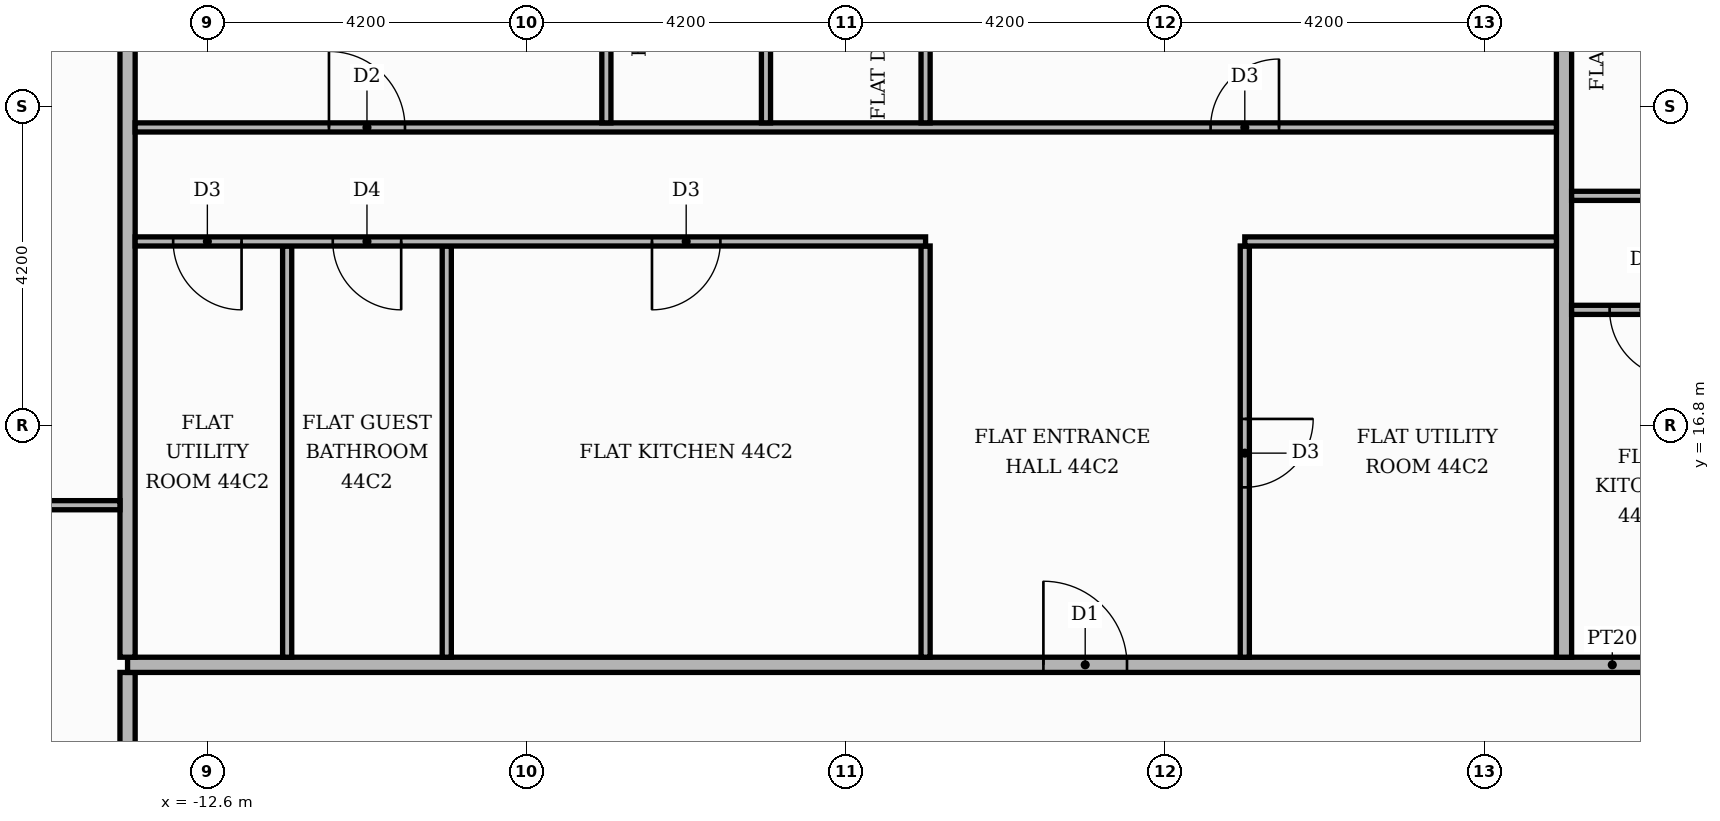
"""IFC4 building model, lengths in metres.
Left out: names, types, materials, properties, quantities, classifications, styles, units other than length and angle.
Written with IfcOpenShell. Run it as: python <this file> out.ifc"""

import sys

from ifc_helpers import new_model, si_unit, direction, frame, frame_2d, origin, place, context, subcontext, project, spatial, rectangle, extrude, element, fill, save


model = new_model("IFC4")
c1 = context("Model", 3, precision=1e-05, world=origin(), true_north=direction((0.0, 1.0)))
c2 = subcontext(c1, "Body", "Model", "MODEL_VIEW")
j1 = project(units=[si_unit("LENGTHUNIT", "METRE"), si_unit("PLANEANGLEUNIT", "RADIAN")], contexts=[c1])
p1 = place(None, origin())
s1 = spatial("IfcSite", under=j1, at=p1, CompositionType="ELEMENT")
p2 = place(p1, origin())
s2 = spatial("IfcBuilding", under=s1, at=p2, CompositionType="ELEMENT")
p3 = place(p2, frame((0.0, 0.0, 188.4)))
s3 = spatial("IfcBuildingStorey", under=s2, at=p3, CompositionType="ELEMENT", Elevation=188.4)
p4 = place(p3, frame((-13.65, 5.35, 0.0), z_axis=(0.0, 0.0, 1.0), x_axis=(0.0, 1.0, 0.0)))
e1 = element("IfcWall", 1, at=p4, inside=s3, PredefinedType="PARTITIONING", context=c2, shape_type="SweptSolid", body=[
    extrude(rectangle(XDim=8.2, YDim=0.2, at=frame_2d((4.1, 0.0))), origin(), (0.0, 0.0, 1.0), 3.48),
])
p5 = place(p4, frame((5.65, 0.0, 0.0)))
e2 = element("IfcOpeningElement", 2, at=p5, cuts=e1, PredefinedType="OPENING", context=c2, shape_type="SweptSolid", body=[
    extrude(rectangle(XDim=1.1, YDim=2.4, at=frame_2d((0.55, 1.2))), frame((0.0, 0.11, 0.0), z_axis=(0.0, -1.0, 0.0), x_axis=(1.0, 0.0, 0.0)), (0.0, 0.0, 1.0), 0.22),
])
p6 = place(p3, frame((-13.65, 13.65, 0.0), z_axis=(0.0, 0.0, 1.0), x_axis=(1.0, 0.0, 0.0)))
e3 = element("IfcWall", 3, at=p6, inside=s3, PredefinedType="PARTITIONING", context=c2, shape_type="SweptSolid", body=[
    extrude(rectangle(XDim=39.07, YDim=0.2, at=frame_2d((19.535, 0.0))), origin(), (0.0, 0.0, 1.0), 3.48),
])
p7 = place(p6, frame((24.65, 0.0, 0.0)))
e4 = element("IfcOpeningElement", 4, at=p7, cuts=e3, PredefinedType="OPENING", context=c2, shape_type="SweptSolid", body=[
    extrude(rectangle(XDim=1.1, YDim=2.4, at=frame_2d((0.55, 1.2))), frame((0.0, 0.11, 0.0), z_axis=(0.0, -1.0, 0.0), x_axis=(1.0, 0.0, 0.0)), (0.0, 0.0, 1.0), 0.22),
])
p8 = place(p6, frame((12.05, 0.0, 0.0)))
e5 = element("IfcOpeningElement", 5, at=p8, cuts=e3, PredefinedType="OPENING", context=c2, shape_type="SweptSolid", body=[
    extrude(rectangle(XDim=1.1, YDim=2.4, at=frame_2d((0.55, 1.2))), frame((0.0, 0.11, 0.0), z_axis=(0.0, -1.0, 0.0), x_axis=(1.0, 0.0, 0.0)), (0.0, 0.0, 1.0), 0.22),
])
p9 = place(p3, frame((-13.65, 13.75, 0.0), z_axis=(0.0, 0.0, 1.0), x_axis=(0.0, 1.0, 0.0)))
e6 = element("IfcWall", 6, at=p9, inside=s3, PredefinedType="PARTITIONING", context=c2, shape_type="SweptSolid", body=[
    extrude(rectangle(XDim=11.67, YDim=0.2, at=frame_2d((5.835, 0.0))), origin(), (0.0, 0.0, 1.0), 3.48),
])
for number, where, z_axis, x_axis in (
    (7, (-11.55, 13.75, 0.0), (0.0, 0.0, 1.0), (0.0, 1.0, 0.0)),
    (8, (-9.45, 13.75, 0.0), (0.0, 0.0, 1.0), (0.0, 1.0, 0.0)),
    (9, (-3.15, 13.75, 0.0), (0.0, 0.0, 1.0), (0.0, 1.0, 0.0)),
):
    element("IfcWall", number, at=place(p3, frame(where, z_axis=z_axis, x_axis=x_axis)), inside=s3, PredefinedType="PARTITIONING", context=c2, shape_type="SweptSolid", body=[
        extrude(rectangle(XDim=5.41, YDim=0.12, at=frame_2d((2.705, 0.0))), origin(), (0.0, 0.0, 1.0), 3.48),
    ])
p10 = place(p3, frame((1.05, 13.75, 0.0), z_axis=(0.0, 0.0, 1.0), x_axis=(0.0, 1.0, 0.0)))
e10 = element("IfcWall", 10, at=p10, inside=s3, PredefinedType="PARTITIONING", context=c2, shape_type="SweptSolid", body=[
    extrude(rectangle(XDim=5.41, YDim=0.12, at=frame_2d((2.705, 0.0))), origin(), (0.0, 0.0, 1.0), 3.48),
])
p11 = place(p10, frame((2.235, 0.0, 0.0)))
e11 = element("IfcOpeningElement", 11, at=p11, cuts=e10, PredefinedType="OPENING", context=c2, shape_type="SweptSolid", body=[
    extrude(rectangle(XDim=0.9, YDim=2.1, at=frame_2d((0.45, 1.05))), frame((0.0, 0.07, 0.0), z_axis=(0.0, -1.0, 0.0), x_axis=(1.0, 0.0, 0.0)), (0.0, 0.0, 1.0), 0.14),
])
p12 = place(p3, frame((5.25, 13.75, 0.0), z_axis=(0.0, 0.0, 1.0), x_axis=(0.0, 1.0, 0.0)))
e12 = element("IfcWall", 12, at=p12, inside=s3, PredefinedType="PARTITIONING", context=c2, shape_type="SweptSolid", body=[
    extrude(rectangle(XDim=11.67, YDim=0.2, at=frame_2d((5.835, 0.0))), origin(), (0.0, 0.0, 1.0), 3.48),
])
p13 = place(p3, frame((-20.42, 15.75, 0.0), z_axis=(0.0, 0.0, 1.0), x_axis=(1.0, 0.0, 0.0)))
e13 = element("IfcWall", 13, at=p13, inside=s3, PredefinedType="PARTITIONING", context=c2, shape_type="SweptSolid", body=[
    extrude(rectangle(XDim=6.67, YDim=0.12, at=frame_2d((3.335, 0.0))), origin(), (0.0, 0.0, 1.0), 3.48),
])
p14 = place(p13, frame((2.885, 0.0, 0.0)))
e14 = element("IfcOpeningElement", 14, at=p14, cuts=e13, PredefinedType="OPENING", context=c2, shape_type="SweptSolid", body=[
    extrude(rectangle(XDim=1.0, YDim=2.1, at=frame_2d((0.5, 1.05))), frame((0.0, 0.07, 0.0), z_axis=(0.0, -1.0, 0.0), x_axis=(1.0, 0.0, 0.0)), (0.0, 0.0, 1.0), 0.14),
])
p15 = place(p3, frame((5.35, 18.32, 0.0), z_axis=(0.0, 0.0, 1.0), x_axis=(1.0, 0.0, 0.0)))
e15 = element("IfcWall", 15, at=p15, inside=s3, PredefinedType="PARTITIONING", context=c2, shape_type="SweptSolid", body=[
    extrude(rectangle(XDim=4.1, YDim=0.12, at=frame_2d((2.05, 0.0))), origin(), (0.0, 0.0, 1.0), 3.48),
])
p16 = place(p15, frame((0.5, 0.0, 0.0)))
e16 = element("IfcOpeningElement", 16, at=p16, cuts=e15, PredefinedType="OPENING", context=c2, shape_type="SweptSolid", body=[
    extrude(rectangle(XDim=0.9, YDim=2.1, at=frame_2d((0.45, 1.05))), frame((0.0, 0.07, 0.0), z_axis=(0.0, -1.0, 0.0), x_axis=(1.0, 0.0, 0.0)), (0.0, 0.0, 1.0), 0.14),
])
p17 = place(p3, frame((-13.55, 19.22, 0.0), z_axis=(0.0, 0.0, 1.0), x_axis=(1.0, 0.0, 0.0)))
e17 = element("IfcWall", 17, at=p17, inside=s3, PredefinedType="PARTITIONING", context=c2, shape_type="SweptSolid", body=[
    extrude(rectangle(XDim=10.4, YDim=0.12, at=frame_2d((5.2, 0.0))), origin(), (0.0, 0.0, 1.0), 3.48),
])
p18 = place(p17, frame((6.8, 0.0, 0.0)))
e18 = element("IfcOpeningElement", 18, at=p18, cuts=e17, PredefinedType="OPENING", context=c2, shape_type="SweptSolid", body=[
    extrude(rectangle(XDim=0.9, YDim=2.1, at=frame_2d((0.45, 1.05))), frame((0.0, 0.07, 0.0), z_axis=(0.0, -1.0, 0.0), x_axis=(1.0, 0.0, 0.0)), (0.0, 0.0, 1.0), 0.14),
])
p19 = place(p17, frame((2.6, 0.0, 0.0)))
e19 = element("IfcOpeningElement", 19, at=p19, cuts=e17, PredefinedType="OPENING", context=c2, shape_type="SweptSolid", body=[
    extrude(rectangle(XDim=0.9, YDim=2.1, at=frame_2d((0.45, 1.05))), frame((0.0, 0.07, 0.0), z_axis=(0.0, -1.0, 0.0), x_axis=(1.0, 0.0, 0.0)), (0.0, 0.0, 1.0), 0.14),
])
p20 = place(p17, frame((0.5, 0.0, 0.0)))
e20 = element("IfcOpeningElement", 20, at=p20, cuts=e17, PredefinedType="OPENING", context=c2, shape_type="SweptSolid", body=[
    extrude(rectangle(XDim=0.9, YDim=2.1, at=frame_2d((0.45, 1.05))), frame((0.0, 0.07, 0.0), z_axis=(0.0, -1.0, 0.0), x_axis=(1.0, 0.0, 0.0)), (0.0, 0.0, 1.0), 0.14),
])
p21 = place(p3, frame((1.05, 19.22, 0.0), z_axis=(0.0, 0.0, 1.0), x_axis=(1.0, 0.0, 0.0)))
e21 = element("IfcWall", 21, at=p21, inside=s3, PredefinedType="PARTITIONING", context=c2, shape_type="SweptSolid", body=[
    extrude(rectangle(XDim=4.1, YDim=0.12, at=frame_2d((2.05, 0.0))), origin(), (0.0, 0.0, 1.0), 3.48),
])
p22 = place(p3, frame((5.35, 19.82, 0.0), z_axis=(0.0, 0.0, 1.0), x_axis=(1.0, 0.0, 0.0)))
e22 = element("IfcWall", 22, at=p22, inside=s3, PredefinedType="PARTITIONING", context=c2, shape_type="SweptSolid", body=[
    extrude(rectangle(XDim=12.25, YDim=0.12, at=frame_2d((6.125, 0.0))), origin(), (0.0, 0.0, 1.0), 3.48),
])
p23 = place(p22, frame((8.85, 0.0, 0.0)))
e23 = element("IfcOpeningElement", 23, at=p23, cuts=e22, PredefinedType="OPENING", context=c2, shape_type="SweptSolid", body=[
    extrude(rectangle(XDim=1.0, YDim=2.1, at=frame_2d((0.5, 1.05))), frame((0.0, 0.07, 0.0), z_axis=(0.0, -1.0, 0.0), x_axis=(1.0, 0.0, 0.0)), (0.0, 0.0, 1.0), 0.14),
])
p24 = place(p22, frame((5.75, 0.0, 0.0)))
e24 = element("IfcOpeningElement", 24, at=p24, cuts=e22, PredefinedType="OPENING", context=c2, shape_type="SweptSolid", body=[
    extrude(rectangle(XDim=0.9, YDim=2.1, at=frame_2d((0.45, 1.05))), frame((0.0, 0.07, 0.0), z_axis=(0.0, -1.0, 0.0), x_axis=(1.0, 0.0, 0.0)), (0.0, 0.0, 1.0), 0.14),
])
p25 = place(p3, frame((-13.55, 20.72, 0.0), z_axis=(0.0, 0.0, 1.0), x_axis=(1.0, 0.0, 0.0)))
e25 = element("IfcWall", 25, at=p25, inside=s3, PredefinedType="PARTITIONING", context=c2, shape_type="SweptSolid", body=[
    extrude(rectangle(XDim=18.7, YDim=0.12, at=frame_2d((9.35, 0.0))), origin(), (0.0, 0.0, 1.0), 3.48),
])
p26 = place(p25, frame((14.15, 0.0, 0.0)))
e26 = element("IfcOpeningElement", 26, at=p26, cuts=e25, PredefinedType="OPENING", context=c2, shape_type="SweptSolid", body=[
    extrude(rectangle(XDim=0.9, YDim=2.1, at=frame_2d((0.45, 1.05))), frame((0.0, 0.07, 0.0), z_axis=(0.0, -1.0, 0.0), x_axis=(1.0, 0.0, 0.0)), (0.0, 0.0, 1.0), 0.14),
])
p27 = place(p25, frame((2.55, 0.0, 0.0)))
e27 = element("IfcOpeningElement", 27, at=p27, cuts=e25, PredefinedType="OPENING", context=c2, shape_type="SweptSolid", body=[
    extrude(rectangle(XDim=1.0, YDim=2.1, at=frame_2d((0.5, 1.05))), frame((0.0, 0.07, 0.0), z_axis=(0.0, -1.0, 0.0), x_axis=(1.0, 0.0, 0.0)), (0.0, 0.0, 1.0), 0.14),
])
p28 = place(p3, frame((-7.35, 20.78, 0.0), z_axis=(0.0, 0.0, 1.0), x_axis=(0.0, 1.0, 0.0)))
e28 = element("IfcWall", 28, at=p28, inside=s3, PredefinedType="PARTITIONING", context=c2, shape_type="SweptSolid", body=[
    extrude(rectangle(XDim=4.64, YDim=0.12, at=frame_2d((2.32, 0.0))), origin(), (0.0, 0.0, 1.0), 3.48),
])
p29 = place(p3, frame((-5.25, 20.78, 0.0), z_axis=(0.0, 0.0, 1.0), x_axis=(0.0, 1.0, 0.0)))
e29 = element("IfcWall", 29, at=p29, inside=s3, PredefinedType="PARTITIONING", context=c2, shape_type="SweptSolid", body=[
    extrude(rectangle(XDim=4.64, YDim=0.12, at=frame_2d((2.32, 0.0))), origin(), (0.0, 0.0, 1.0), 3.48),
])
p30 = place(p29, frame((1.99, 0.0, 0.0)))
e30 = element("IfcOpeningElement", 30, at=p30, cuts=e29, PredefinedType="OPENING", context=c2, shape_type="SweptSolid", body=[
    extrude(rectangle(XDim=0.9, YDim=2.1, at=frame_2d((0.45, 1.05))), frame((0.0, 0.07, 0.0), z_axis=(0.0, -1.0, 0.0), x_axis=(1.0, 0.0, 0.0)), (0.0, 0.0, 1.0), 0.14),
])
p31 = place(p3, frame((-3.15, 20.78, 0.0), z_axis=(0.0, 0.0, 1.0), x_axis=(0.0, 1.0, 0.0)))
e31 = element("IfcWall", 31, at=p31, inside=s3, PredefinedType="PARTITIONING", context=c2, shape_type="SweptSolid", body=[
    extrude(rectangle(XDim=4.64, YDim=0.12, at=frame_2d((2.32, 0.0))), origin(), (0.0, 0.0, 1.0), 3.48),
])
p32 = place(p31, frame((1.99, 0.0, 0.0)))
e32 = element("IfcOpeningElement", 32, at=p32, cuts=e31, PredefinedType="OPENING", context=c2, shape_type="SweptSolid", body=[
    extrude(rectangle(XDim=0.9, YDim=2.1, at=frame_2d((0.45, 1.05))), frame((0.0, 0.07, 0.0), z_axis=(0.0, -1.0, 0.0), x_axis=(1.0, 0.0, 0.0)), (0.0, 0.0, 1.0), 0.14),
])
p33 = place(p16, frame((0.9, 0.0, 0.0), z_axis=(0.0, 0.0, 1.0), x_axis=(-1.0, 0.0, 0.0)))
e33 = element("IfcDoor", 33, at=p33, inside=s3, OperationType="SINGLE_SWING_RIGHT", PredefinedType="DOOR", context=c2, shape_type="SweptSolid", body=[
    extrude(rectangle(XDim=0.9, YDim=2.1, at=frame_2d((0.45, 1.05))), frame((0.0, 0.025, 0.0), z_axis=(0.0, -1.0, 0.0), x_axis=(1.0, 0.0, 0.0)), (0.0, 0.0, 1.0), 0.05),
])
fill(e16, e33)
p34 = place(p8, origin())
e34 = element("IfcDoor", 34, at=p34, inside=s3, OperationType="SINGLE_SWING_LEFT", PredefinedType="DOOR", context=c2, shape_type="SweptSolid", body=[
    extrude(rectangle(XDim=1.1, YDim=2.4, at=frame_2d((0.55, 1.2))), frame((0.0, 0.025, 0.0), z_axis=(0.0, -1.0, 0.0), x_axis=(1.0, 0.0, 0.0)), (0.0, 0.0, 1.0), 0.05),
])
fill(e5, e34)
p35 = place(p11, frame((0.9, 0.0, 0.0), z_axis=(0.0, 0.0, 1.0), x_axis=(-1.0, 0.0, 0.0)))
e35 = element("IfcDoor", 35, at=p35, inside=s3, OperationType="SINGLE_SWING_RIGHT", PredefinedType="DOOR", context=c2, shape_type="SweptSolid", body=[
    extrude(rectangle(XDim=0.9, YDim=2.1, at=frame_2d((0.45, 1.05))), frame((0.0, 0.025, 0.0), z_axis=(0.0, -1.0, 0.0), x_axis=(1.0, 0.0, 0.0)), (0.0, 0.0, 1.0), 0.05),
])
fill(e11, e35)
p36 = place(p18, frame((0.9, 0.0, 0.0), z_axis=(0.0, 0.0, 1.0), x_axis=(-1.0, 0.0, 0.0)))
e36 = element("IfcDoor", 36, at=p36, inside=s3, OperationType="SINGLE_SWING_LEFT", PredefinedType="DOOR", context=c2, shape_type="SweptSolid", body=[
    extrude(rectangle(XDim=0.9, YDim=2.1, at=frame_2d((0.45, 1.05))), frame((0.0, 0.025, 0.0), z_axis=(0.0, -1.0, 0.0), x_axis=(1.0, 0.0, 0.0)), (0.0, 0.0, 1.0), 0.05),
])
fill(e18, e36)
p37 = place(p19, frame((0.9, 0.0, 0.0), z_axis=(0.0, 0.0, 1.0), x_axis=(-1.0, 0.0, 0.0)))
e37 = element("IfcDoor", 37, at=p37, inside=s3, OperationType="SINGLE_SWING_RIGHT", PredefinedType="DOOR", context=c2, shape_type="SweptSolid", body=[
    extrude(rectangle(XDim=0.9, YDim=2.1, at=frame_2d((0.45, 1.05))), frame((0.0, 0.025, 0.0), z_axis=(0.0, -1.0, 0.0), x_axis=(1.0, 0.0, 0.0)), (0.0, 0.0, 1.0), 0.05),
])
fill(e19, e37)
p38 = place(p20, frame((0.9, 0.0, 0.0), z_axis=(0.0, 0.0, 1.0), x_axis=(-1.0, 0.0, 0.0)))
e38 = element("IfcDoor", 38, at=p38, inside=s3, OperationType="SINGLE_SWING_RIGHT", PredefinedType="DOOR", context=c2, shape_type="SweptSolid", body=[
    extrude(rectangle(XDim=0.9, YDim=2.1, at=frame_2d((0.45, 1.05))), frame((0.0, 0.025, 0.0), z_axis=(0.0, -1.0, 0.0), x_axis=(1.0, 0.0, 0.0)), (0.0, 0.0, 1.0), 0.05),
])
fill(e20, e38)
p39 = place(p26, origin())
e39 = element("IfcDoor", 39, at=p39, inside=s3, OperationType="SINGLE_SWING_RIGHT", PredefinedType="DOOR", context=c2, shape_type="SweptSolid", body=[
    extrude(rectangle(XDim=0.9, YDim=2.1, at=frame_2d((0.45, 1.05))), frame((0.0, 0.025, 0.0), z_axis=(0.0, -1.0, 0.0), x_axis=(1.0, 0.0, 0.0)), (0.0, 0.0, 1.0), 0.05),
])
fill(e26, e39)
p40 = place(p27, origin())
e40 = element("IfcDoor", 40, at=p40, inside=s3, OperationType="SINGLE_SWING_LEFT", PredefinedType="DOOR", context=c2, shape_type="SweptSolid", body=[
    extrude(rectangle(XDim=1.0, YDim=2.1, at=frame_2d((0.5, 1.05))), frame((0.0, 0.025, 0.0), z_axis=(0.0, -1.0, 0.0), x_axis=(1.0, 0.0, 0.0)), (0.0, 0.0, 1.0), 0.05),
])
fill(e27, e40)
save(model, sys.argv[1])
